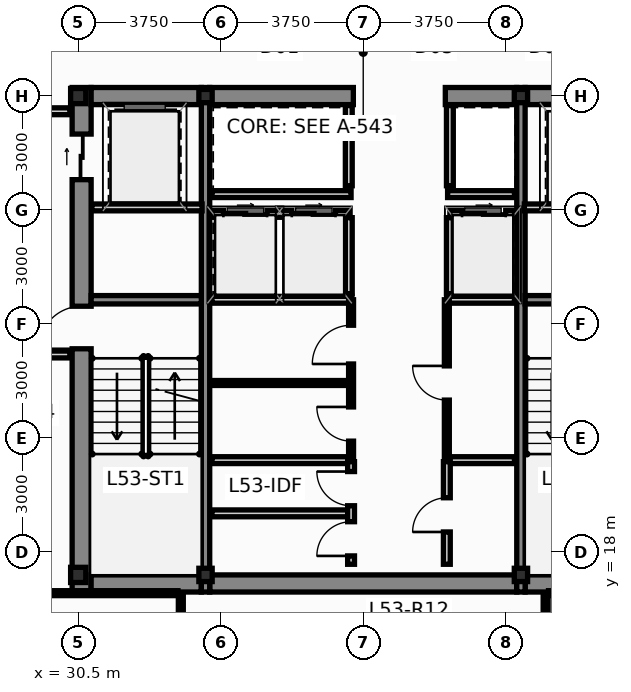
"""IFC4 building model, lengths in metres.
Left out: names, types, materials, properties, quantities, classifications, styles, units other than length and angle.
Written with IfcOpenShell. Run it as: python <this file> out.ifc"""

import sys

from ifc_helpers import new_model, si_unit, direction, frame, frame_2d, origin, origin_2d, place, context, subcontext, project, spatial, rectangle, hollow_rectangle, i_section, extrude, source, transform, mapped, element, fill, save


model = new_model("IFC4")
c1 = context("Model", 3, precision=1e-05, world=origin(), true_north=direction((0.0, 1.0)))
c2 = subcontext(c1, "Body", "Model", "MODEL_VIEW")
j1 = project(units=[si_unit("LENGTHUNIT", "METRE"), si_unit("PLANEANGLEUNIT", "RADIAN")], contexts=[c1])
p1 = place(None, origin())
s1 = spatial("IfcSite", under=j1, at=p1, CompositionType="ELEMENT")
p2 = place(p1, origin())
s2 = spatial("IfcBuilding", under=s1, at=p2, CompositionType="ELEMENT")
p3 = place(p2, frame((0.0, 0.0, 202.3)))
s3 = spatial("IfcBuildingStorey", under=s2, at=p3, CompositionType="ELEMENT", Elevation=202.3)
m1 = source(origin(), c2, "Body", "SweptSolid", [
    extrude(i_section(OverallWidth=0.4, OverallDepth=0.4, WebThickness=0.02, FlangeThickness=0.032, at=origin_2d()), origin(), (0.0, 0.0, 1.0), 3.65),
])
for number, where, z_axis, x_axis in (
    (1, (30.5, 17.4, 0.0), (0.0, 0.0, 1.0), (1.0, 0.0, 0.0)),
    (2, (30.5, 30.0, 0.0), (0.0, 0.0, 1.0), (1.0, 0.0, 0.0)),
):
    element("IfcColumn", number, at=place(p3, frame(where, z_axis=z_axis, x_axis=x_axis)), inside=s3, PredefinedType="COLUMN", context=c2, shape_type="MappedRepresentation", body=[
        mapped(m1, transform((0.0, 0.0, 0.0), scale=1.0)),
    ])
m2 = source(origin(), c2, "Body", "SweptSolid", [
    extrude(hollow_rectangle(XDim=0.35, YDim=0.35, WallThickness=0.016, at=origin_2d()), origin(), (0.0, 0.0, 1.0), 3.65),
])
for number, where, z_axis, x_axis in (
    (3, (33.85, 17.4, 0.0), (0.0, 0.0, 1.0), (1.0, 0.0, 0.0)),
    (4, (42.15, 17.4, 0.0), (0.0, 0.0, 1.0), (1.0, 0.0, 0.0)),
    (5, (33.85, 30.0, 0.0), (0.0, 0.0, 1.0), (1.0, 0.0, 0.0)),
    (6, (42.15, 30.0, 0.0), (0.0, 0.0, 1.0), (1.0, 0.0, 0.0)),
):
    element("IfcColumn", number, at=place(p3, frame(where, z_axis=z_axis, x_axis=x_axis)), inside=s3, PredefinedType="COLUMN", context=c2, shape_type="MappedRepresentation", body=[
        mapped(m2, transform((0.0, 0.0, 0.0), scale=1.0)),
    ])
p4 = place(p3, frame((30.59, 16.95, 0.0), z_axis=(0.0, 0.0, 1.0), x_axis=(0.0, 1.0, 0.0)))
e7 = element("IfcWall", 7, at=p4, inside=s3, PredefinedType="SHEAR", context=c2, shape_type="SweptSolid", body=[
    extrude(rectangle(XDim=13.275, YDim=0.5, at=frame_2d((6.638, 0.0))), origin(), (0.0, 0.0, 1.0), 3.65),
])
p5 = place(p4, frame((6.4, 0.0, 0.0)))
e8 = element("IfcOpeningElement", 8, at=p5, cuts=e7, PredefinedType="OPENING", context=c2, shape_type="SweptSolid", body=[
    extrude(rectangle(XDim=1.12, YDim=2.15, at=frame_2d((0.56, 1.075))), frame((0.0, 0.262, 0.0), z_axis=(0.0, -1.0, 0.0), x_axis=(1.0, 0.0, 0.0)), (0.0, 0.0, 1.0), 0.524),
])
p6 = place(p4, frame((10.85, 0.0, 0.0)))
e9 = element("IfcOpeningElement", 9, at=p6, cuts=e7, PredefinedType="OPENING", context=c2, shape_type="SweptSolid", body=[
    extrude(rectangle(XDim=1.2, YDim=2.2, at=frame_2d((0.6, 1.1))), frame((0.0, 0.262, 0.0), z_axis=(0.0, -1.0, 0.0), x_axis=(1.0, 0.0, 0.0)), (0.0, 0.0, 1.0), 0.524),
])
p7 = place(p3, frame((30.84, 17.175, 0.0), z_axis=(0.0, 0.0, 1.0), x_axis=(1.0, 0.0, 0.0)))
e10 = element("IfcWall", 10, at=p7, inside=s3, PredefinedType="SHEAR", context=c2, shape_type="SweptSolid", body=[
    extrude(rectangle(XDim=2.9, YDim=0.45, at=frame_2d((1.45, 0.0))), origin(), (0.0, 0.0, 1.0), 3.65),
])
p8 = place(p3, frame((33.96, 17.175, 0.0), z_axis=(0.0, 0.0, 1.0), x_axis=(1.0, 0.0, 0.0)))
e11 = element("IfcWall", 11, at=p8, inside=s3, PredefinedType="SHEAR", context=c2, shape_type="SweptSolid", body=[
    extrude(rectangle(XDim=8.08, YDim=0.45, at=frame_2d((4.04, 0.0))), origin(), (0.0, 0.0, 1.0), 3.65),
])
for number, where, z_axis, x_axis in (
    (12, (42.26, 17.175, 0.0), (0.0, 0.0, 1.0), (1.0, 0.0, 0.0)),
    (13, (30.84, 30.0, 0.0), (0.0, 0.0, 1.0), (1.0, 0.0, 0.0)),
):
    element("IfcWall", number, at=place(p3, frame(where, z_axis=z_axis, x_axis=x_axis)), inside=s3, PredefinedType="SHEAR", context=c2, shape_type="SweptSolid", body=[
        extrude(rectangle(XDim=2.9, YDim=0.45, at=frame_2d((1.45, 0.0))), origin(), (0.0, 0.0, 1.0), 3.65),
    ])
p9 = place(p3, frame((33.96, 30.0, 0.0), z_axis=(0.0, 0.0, 1.0), x_axis=(1.0, 0.0, 0.0)))
e14 = element("IfcWall", 14, at=p9, inside=s3, PredefinedType="SHEAR", context=c2, shape_type="SweptSolid", body=[
    extrude(rectangle(XDim=3.78, YDim=0.45, at=frame_2d((1.89, 0.0))), origin(), (0.0, 0.0, 1.0), 3.65),
])
p10 = place(p3, frame((40.16, 30.0, 0.0), z_axis=(0.0, 0.0, 1.0), x_axis=(1.0, 0.0, 0.0)))
e15 = element("IfcWall", 15, at=p10, inside=s3, PredefinedType="SHEAR", context=c2, shape_type="SweptSolid", body=[
    extrude(rectangle(XDim=1.88, YDim=0.45, at=frame_2d((0.94, 0.0))), origin(), (0.0, 0.0, 1.0), 3.65),
])
p11 = place(p3, frame((42.26, 30.0, 0.0), z_axis=(0.0, 0.0, 1.0), x_axis=(1.0, 0.0, 0.0)))
e16 = element("IfcWall", 16, at=p11, inside=s3, PredefinedType="SHEAR", context=c2, shape_type="SweptSolid", body=[
    extrude(rectangle(XDim=2.9, YDim=0.45, at=frame_2d((1.45, 0.0))), origin(), (0.0, 0.0, 1.0), 3.65),
])
for number, where, z_axis, x_axis in (
    (17, (33.85, 16.95, 0.0), (0.0, 0.0, 1.0), (0.0, 1.0, 0.0)),
    (18, (42.15, 16.95, 0.0), (0.0, 0.0, 1.0), (0.0, 1.0, 0.0)),
):
    element("IfcWall", number, at=place(p3, frame(where, z_axis=z_axis, x_axis=x_axis)), inside=s3, PredefinedType="SHEAR", context=c2, shape_type="SweptSolid", body=[
        extrude(rectangle(XDim=13.275, YDim=0.22, at=frame_2d((6.638, 0.0))), origin(), (0.0, 0.0, 1.0), 3.65),
    ])
for number, where, z_axis, x_axis in (
    (19, (30.84, 24.64, 0.0), (0.0, 0.0, 1.0), (1.0, 0.0, 0.0)),
    (20, (42.26, 24.64, 0.0), (0.0, 0.0, 1.0), (1.0, 0.0, 0.0)),
):
    element("IfcWall", number, at=place(p3, frame(where, z_axis=z_axis, x_axis=x_axis)), inside=s3, PredefinedType="SHEAR", context=c2, shape_type="SweptSolid", body=[
        extrude(rectangle(XDim=2.9, YDim=0.22, at=frame_2d((1.45, 0.0))), origin(), (0.0, 0.0, 1.0), 3.65),
    ])
p12 = place(p3, frame((34.02, 26.9, 0.0), z_axis=(0.0, 0.0, 1.0), x_axis=(1.0, 0.0, 0.0)))
e21 = element("IfcWall", 21, at=p12, inside=s3, PredefinedType="PARTITIONING", context=c2, shape_type="SweptSolid", body=[
    extrude(rectangle(XDim=3.6, YDim=0.18, at=frame_2d((1.8, 0.0))), origin(), (0.0, 0.0, 1.0), 3.4),
])
p13 = place(p12, frame((0.3, 0.0, 0.0)))
e22 = element("IfcOpeningElement", 22, at=p13, cuts=e21, PredefinedType="OPENING", context=c2, shape_type="SweptSolid", body=[
    extrude(rectangle(XDim=1.15, YDim=2.2, at=frame_2d((0.575, 1.1))), frame((0.0, 0.102, 0.0), z_axis=(0.0, -1.0, 0.0), x_axis=(1.0, 0.0, 0.0)), (0.0, 0.0, 1.0), 0.204),
])
p14 = place(p12, frame((2.1, 0.0, 0.0)))
e23 = element("IfcOpeningElement", 23, at=p14, cuts=e21, PredefinedType="OPENING", context=c2, shape_type="SweptSolid", body=[
    extrude(rectangle(XDim=1.15, YDim=2.2, at=frame_2d((0.575, 1.1))), frame((0.0, 0.102, 0.0), z_axis=(0.0, -1.0, 0.0), x_axis=(1.0, 0.0, 0.0)), (0.0, 0.0, 1.0), 0.204),
])
p15 = place(p3, frame((40.28, 26.9, 0.0), z_axis=(0.0, 0.0, 1.0), x_axis=(1.0, 0.0, 0.0)))
e24 = element("IfcWall", 24, at=p15, inside=s3, PredefinedType="PARTITIONING", context=c2, shape_type="SweptSolid", body=[
    extrude(rectangle(XDim=1.7, YDim=0.18, at=frame_2d((0.85, 0.0))), origin(), (0.0, 0.0, 1.0), 3.4),
])
p16 = place(p15, frame((0.32, 0.0, 0.0)))
e25 = element("IfcOpeningElement", 25, at=p16, cuts=e24, PredefinedType="OPENING", context=c2, shape_type="SweptSolid", body=[
    extrude(rectangle(XDim=1.15, YDim=2.2, at=frame_2d((0.575, 1.1))), frame((0.0, 0.102, 0.0), z_axis=(0.0, -1.0, 0.0), x_axis=(1.0, 0.0, 0.0)), (0.0, 0.0, 1.0), 0.204),
])
for number, where, z_axis, x_axis in (
    (26, (37.62, 24.8, 0.0), (0.0, 0.0, 1.0), (0.0, 1.0, 0.0)),
    (27, (40.28, 24.8, 0.0), (0.0, 0.0, 1.0), (0.0, 1.0, 0.0)),
):
    element("IfcWall", number, at=place(p3, frame(where, z_axis=z_axis, x_axis=x_axis)), inside=s3, PredefinedType="PARTITIONING", context=c2, shape_type="SweptSolid", body=[
        extrude(rectangle(XDim=2.0, YDim=0.18, at=frame_2d((1.0, 0.0))), origin(), (0.0, 0.0, 1.0), 3.4),
    ])
p17 = place(p3, frame((34.02, 24.64, 0.0), z_axis=(0.0, 0.0, 1.0), x_axis=(1.0, 0.0, 0.0)))
e28 = element("IfcWall", 28, at=p17, inside=s3, PredefinedType="PARTITIONING", context=c2, shape_type="SweptSolid", body=[
    extrude(rectangle(XDim=3.68, YDim=0.18, at=frame_2d((1.84, 0.0))), origin(), (0.0, 0.0, 1.0), 3.4),
])
p18 = place(p3, frame((40.2, 24.64, 0.0), z_axis=(0.0, 0.0, 1.0), x_axis=(1.0, 0.0, 0.0)))
e29 = element("IfcWall", 29, at=p18, inside=s3, PredefinedType="PARTITIONING", context=c2, shape_type="SweptSolid", body=[
    extrude(rectangle(XDim=1.78, YDim=0.18, at=frame_2d((0.89, 0.0))), origin(), (0.0, 0.0, 1.0), 3.4),
])
p19 = place(p3, frame((34.02, 27.42, 0.0), z_axis=(0.0, 0.0, 1.0), x_axis=(1.0, 0.0, 0.0)))
e30 = element("IfcWall", 30, at=p19, inside=s3, PredefinedType="PARTITIONING", context=c2, shape_type="SweptSolid", body=[
    extrude(rectangle(XDim=3.66, YDim=0.18, at=frame_2d((1.83, 0.0))), origin(), (0.0, 0.0, 1.0), 3.4),
])
p20 = place(p3, frame((40.22, 27.42, 0.0), z_axis=(0.0, 0.0, 1.0), x_axis=(1.0, 0.0, 0.0)))
e31 = element("IfcWall", 31, at=p20, inside=s3, PredefinedType="PARTITIONING", context=c2, shape_type="SweptSolid", body=[
    extrude(rectangle(XDim=1.76, YDim=0.18, at=frame_2d((0.88, 0.0))), origin(), (0.0, 0.0, 1.0), 3.4),
])
for number, where, z_axis, x_axis in (
    (32, (37.62, 27.64, 0.0), (0.0, 0.0, 1.0), (0.0, 1.0, 0.0)),
    (33, (40.28, 27.64, 0.0), (0.0, 0.0, 1.0), (0.0, 1.0, 0.0)),
):
    element("IfcWall", number, at=place(p3, frame(where, z_axis=z_axis, x_axis=x_axis)), inside=s3, PredefinedType="PARTITIONING", context=c2, shape_type="SweptSolid", body=[
        extrude(rectangle(XDim=2.11, YDim=0.18, at=frame_2d((1.055, 0.0))), origin(), (0.0, 0.0, 1.0), 3.4),
    ])
p21 = place(p3, frame((27.52, 23.2, 0.0), z_axis=(0.0, 0.0, 1.0), x_axis=(1.0, 0.0, 0.0)))
e34 = element("IfcWall", 34, at=p21, inside=s3, PredefinedType="PARTITIONING", context=c2, shape_type="SweptSolid", body=[
    extrude(rectangle(XDim=2.76, YDim=0.18, at=frame_2d((1.38, 0.0))), origin(), (0.0, 0.0, 1.0), 3.4),
])
p22 = place(p3, frame((27.52, 29.6, 0.0), z_axis=(0.0, 0.0, 1.0), x_axis=(1.0, 0.0, 0.0)))
e35 = element("IfcWall", 35, at=p22, inside=s3, PredefinedType="PARTITIONING", context=c2, shape_type="SweptSolid", body=[
    extrude(rectangle(XDim=2.76, YDim=0.18, at=frame_2d((1.38, 0.0))), origin(), (0.0, 0.0, 1.0), 2.925),
])
for number, where, z_axis, x_axis in (
    (36, (30.86, 27.07, 0.0), (0.0, 0.0, 1.0), (1.0, 0.0, 0.0)),
    (37, (42.24, 27.07, 0.0), (0.0, 0.0, 1.0), (1.0, 0.0, 0.0)),
):
    element("IfcWall", number, at=place(p3, frame(where, z_axis=z_axis, x_axis=x_axis)), inside=s3, PredefinedType="PARTITIONING", context=c2, shape_type="SweptSolid", body=[
        extrude(rectangle(XDim=2.9, YDim=0.18, at=frame_2d((1.45, 0.0))), origin(), (0.0, 0.0, 1.0), 3.4),
    ])
p23 = place(p3, frame((34.02, 20.42, 0.0), z_axis=(0.0, 0.0, 1.0), x_axis=(1.0, 0.0, 0.0)))
e38 = element("IfcWall", 38, at=p23, inside=s3, PredefinedType="PARTITIONING", context=c2, shape_type="SweptSolid", body=[
    extrude(rectangle(XDim=3.64, YDim=0.18, at=frame_2d((1.82, 0.0))), origin(), (0.0, 0.0, 1.0), 3.4),
])
p24 = place(p3, frame((40.22, 20.42, 0.0), z_axis=(0.0, 0.0, 1.0), x_axis=(1.0, 0.0, 0.0)))
e39 = element("IfcWall", 39, at=p24, inside=s3, PredefinedType="PARTITIONING", context=c2, shape_type="SweptSolid", body=[
    extrude(rectangle(XDim=1.76, YDim=0.18, at=frame_2d((0.88, 0.0))), origin(), (0.0, 0.0, 1.0), 3.4),
])
p25 = place(p3, frame((34.02, 22.45, 0.0), z_axis=(0.0, 0.0, 1.0), x_axis=(1.0, 0.0, 0.0)))
e40 = element("IfcWall", 40, at=p25, inside=s3, PredefinedType="PARTITIONING", context=c2, shape_type="SweptSolid", body=[
    extrude(rectangle(XDim=3.58, YDim=0.13, at=frame_2d((1.79, 0.0))), origin(), (0.0, 0.0, 1.0), 3.4),
])
p26 = place(p3, frame((37.68, 20.5, 0.0), z_axis=(0.0, 0.0, 1.0), x_axis=(0.0, 1.0, 0.0)))
e41 = element("IfcWall", 41, at=p26, inside=s3, PredefinedType="PARTITIONING", context=c2, shape_type="SweptSolid", body=[
    extrude(rectangle(XDim=4.14, YDim=0.13, at=frame_2d((2.07, 0.0))), origin(), (0.0, 0.0, 1.0), 3.4),
])
p27 = place(p26, frame((0.42, 0.0, 0.0)))
e42 = element("IfcOpeningElement", 42, at=p27, cuts=e41, PredefinedType="OPENING", context=c2, shape_type="SweptSolid", body=[
    extrude(rectangle(XDim=0.9, YDim=2.1, at=frame_2d((0.45, 1.05))), frame((0.0, 0.077, 0.0), z_axis=(0.0, -1.0, 0.0), x_axis=(1.0, 0.0, 0.0)), (0.0, 0.0, 1.0), 0.154),
])
p28 = place(p26, frame((2.45, 0.0, 0.0)))
e43 = element("IfcOpeningElement", 43, at=p28, cuts=e41, PredefinedType="OPENING", context=c2, shape_type="SweptSolid", body=[
    extrude(rectangle(XDim=1.02, YDim=2.15, at=frame_2d((0.51, 1.075))), frame((0.0, 0.077, 0.0), z_axis=(0.0, -1.0, 0.0), x_axis=(1.0, 0.0, 0.0)), (0.0, 0.0, 1.0), 0.154),
])
p29 = place(p3, frame((40.2, 20.5, 0.0), z_axis=(0.0, 0.0, 1.0), x_axis=(0.0, 1.0, 0.0)))
e44 = element("IfcWall", 44, at=p29, inside=s3, PredefinedType="PARTITIONING", context=c2, shape_type="SweptSolid", body=[
    extrude(rectangle(XDim=4.14, YDim=0.13, at=frame_2d((2.07, 0.0))), origin(), (0.0, 0.0, 1.0), 3.4),
])
p30 = place(p29, frame((1.5, 0.0, 0.0)))
e45 = element("IfcOpeningElement", 45, at=p30, cuts=e44, PredefinedType="OPENING", context=c2, shape_type="SweptSolid", body=[
    extrude(rectangle(XDim=0.9, YDim=2.1, at=frame_2d((0.45, 1.05))), frame((0.0, 0.077, 0.0), z_axis=(0.0, -1.0, 0.0), x_axis=(1.0, 0.0, 0.0)), (0.0, 0.0, 1.0), 0.154),
])
p31 = place(p3, frame((34.02, 19.02, 0.0), z_axis=(0.0, 0.0, 1.0), x_axis=(1.0, 0.0, 0.0)))
e46 = element("IfcWall", 46, at=p31, inside=s3, PredefinedType="PARTITIONING", context=c2, shape_type="SweptSolid", body=[
    extrude(rectangle(XDim=3.58, YDim=0.18, at=frame_2d((1.79, 0.0))), origin(), (0.0, 0.0, 1.0), 3.4),
])
p32 = place(p3, frame((37.68, 17.68, 0.0), z_axis=(0.0, 0.0, 1.0), x_axis=(0.0, 1.0, 0.0)))
e47 = element("IfcWall", 47, at=p32, inside=s3, PredefinedType="PARTITIONING", context=c2, shape_type="SweptSolid", body=[
    extrude(rectangle(XDim=2.7, YDim=0.18, at=frame_2d((1.35, 0.0))), origin(), (0.0, 0.0, 1.0), 3.4),
])
p33 = place(p32, frame((0.22, 0.0, 0.0)))
e48 = element("IfcOpeningElement", 48, at=p33, cuts=e47, PredefinedType="OPENING", context=c2, shape_type="SweptSolid", body=[
    extrude(rectangle(XDim=0.9, YDim=2.1, at=frame_2d((0.45, 1.05))), frame((0.0, 0.102, 0.0), z_axis=(0.0, -1.0, 0.0), x_axis=(1.0, 0.0, 0.0)), (0.0, 0.0, 1.0), 0.204),
])
p34 = place(p32, frame((1.54, 0.0, 0.0)))
e49 = element("IfcOpeningElement", 49, at=p34, cuts=e47, PredefinedType="OPENING", context=c2, shape_type="SweptSolid", body=[
    extrude(rectangle(XDim=0.9, YDim=2.1, at=frame_2d((0.45, 1.05))), frame((0.0, 0.102, 0.0), z_axis=(0.0, -1.0, 0.0), x_axis=(1.0, 0.0, 0.0)), (0.0, 0.0, 1.0), 0.204),
])
p35 = place(p3, frame((40.2, 17.68, 0.0), z_axis=(0.0, 0.0, 1.0), x_axis=(0.0, 1.0, 0.0)))
e50 = element("IfcWall", 50, at=p35, inside=s3, PredefinedType="PARTITIONING", context=c2, shape_type="SweptSolid", body=[
    extrude(rectangle(XDim=2.7, YDim=0.18, at=frame_2d((1.35, 0.0))), origin(), (0.0, 0.0, 1.0), 3.4),
])
p36 = place(p35, frame((0.85, 0.0, 0.0)))
e51 = element("IfcOpeningElement", 51, at=p36, cuts=e50, PredefinedType="OPENING", context=c2, shape_type="SweptSolid", body=[
    extrude(rectangle(XDim=0.9, YDim=2.1, at=frame_2d((0.45, 1.05))), frame((0.0, 0.102, 0.0), z_axis=(0.0, -1.0, 0.0), x_axis=(1.0, 0.0, 0.0)), (0.0, 0.0, 1.0), 0.204),
])
p37 = place(p3, frame((42.875, 16.92, 0.0), z_axis=(0.0, 0.0, 1.0), x_axis=(1.0, 0.0, 0.0)))
e52 = element("IfcWall", 52, at=p37, inside=s3, PredefinedType="PARTITIONING", context=c2, shape_type="SweptSolid", body=[
    extrude(rectangle(XDim=9.62, YDim=0.13, at=frame_2d((4.81, 0.0))), origin(), (0.0, 0.0, 1.0), 2.925),
])
p38 = place(p37, frame((4.33, 0.0, 0.0)))
e53 = element("IfcOpeningElement", 53, at=p38, cuts=e52, PredefinedType="OPENING", context=c2, shape_type="SweptSolid", body=[
    extrude(rectangle(XDim=0.96, YDim=2.15, at=frame_2d((0.48, 1.075))), frame((0.0, 0.077, 0.0), z_axis=(0.0, -1.0, 0.0), x_axis=(1.0, 0.0, 0.0)), (0.0, 0.0, 1.0), 0.154),
])
p39 = place(p3, frame((27.405, 16.92, 0.0), z_axis=(0.0, 0.0, 1.0), x_axis=(1.0, 0.0, 0.0)))
e54 = element("IfcWall", 54, at=p39, inside=s3, PredefinedType="PARTITIONING", context=c2, shape_type="SweptSolid", body=[
    extrude(rectangle(XDim=5.72, YDim=0.13, at=frame_2d((2.86, 0.0))), origin(), (0.0, 0.0, 1.0), 2.925),
])
for number, where, z_axis, x_axis in (
    (55, (33.2, 13.535, 0.0), (0.0, 0.0, 1.0), (0.0, 1.0, 0.0)),
    (56, (42.8, 13.535, 0.0), (0.0, 0.0, 1.0), (0.0, 1.0, 0.0)),
):
    element("IfcWall", number, at=place(p3, frame(where, z_axis=z_axis, x_axis=x_axis)), inside=s3, PredefinedType="PARTITIONING", context=c2, shape_type="SweptSolid", body=[
        extrude(rectangle(XDim=3.31, YDim=0.13, at=frame_2d((1.655, 0.0))), origin(), (0.0, 0.0, 1.0), 3.4),
    ])
p40 = place(p5, origin())
e57 = element("IfcDoor", 57, at=p40, inside=s3, OperationType="SINGLE_SWING_LEFT", PredefinedType="DOOR", context=c2, shape_type="SweptSolid", body=[
    extrude(rectangle(XDim=1.12, YDim=2.15, at=frame_2d((0.56, 1.075))), frame((0.0, 0.025, 0.0), z_axis=(0.0, -1.0, 0.0), x_axis=(1.0, 0.0, 0.0)), (0.0, 0.0, 1.0), 0.05),
])
fill(e8, e57)
p41 = place(p6, origin())
e58 = element("IfcDoor", 58, at=p41, inside=s3, OperationType="SLIDING_TO_LEFT", PredefinedType="DOOR", context=c2, shape_type="SweptSolid", body=[
    extrude(rectangle(XDim=1.2, YDim=2.2, at=frame_2d((0.6, 1.1))), frame((0.0, 0.025, 0.0), z_axis=(0.0, -1.0, 0.0), x_axis=(1.0, 0.0, 0.0)), (0.0, 0.0, 1.0), 0.05),
])
fill(e9, e58)
p42 = place(p13, origin())
e59 = element("IfcDoor", 59, at=p42, inside=s3, OperationType="SLIDING_TO_LEFT", PredefinedType="DOOR", context=c2, shape_type="SweptSolid", body=[
    extrude(rectangle(XDim=1.15, YDim=2.2, at=frame_2d((0.575, 1.1))), frame((0.0, 0.025, 0.0), z_axis=(0.0, -1.0, 0.0), x_axis=(1.0, 0.0, 0.0)), (0.0, 0.0, 1.0), 0.05),
])
fill(e22, e59)
p43 = place(p14, origin())
e60 = element("IfcDoor", 60, at=p43, inside=s3, OperationType="SLIDING_TO_RIGHT", PredefinedType="DOOR", context=c2, shape_type="SweptSolid", body=[
    extrude(rectangle(XDim=1.15, YDim=2.2, at=frame_2d((0.575, 1.1))), frame((0.0, 0.025, 0.0), z_axis=(0.0, -1.0, 0.0), x_axis=(1.0, 0.0, 0.0)), (0.0, 0.0, 1.0), 0.05),
])
fill(e23, e60)
p44 = place(p16, origin())
e61 = element("IfcDoor", 61, at=p44, inside=s3, OperationType="SLIDING_TO_LEFT", PredefinedType="DOOR", context=c2, shape_type="SweptSolid", body=[
    extrude(rectangle(XDim=1.15, YDim=2.2, at=frame_2d((0.575, 1.1))), frame((0.0, 0.025, 0.0), z_axis=(0.0, -1.0, 0.0), x_axis=(1.0, 0.0, 0.0)), (0.0, 0.0, 1.0), 0.05),
])
fill(e25, e61)
p45 = place(p27, origin())
e62 = element("IfcDoor", 62, at=p45, inside=s3, OperationType="SINGLE_SWING_RIGHT", PredefinedType="DOOR", context=c2, shape_type="SweptSolid", body=[
    extrude(rectangle(XDim=0.9, YDim=2.1, at=frame_2d((0.45, 1.05))), frame((0.0, 0.025, 0.0), z_axis=(0.0, -1.0, 0.0), x_axis=(1.0, 0.0, 0.0)), (0.0, 0.0, 1.0), 0.05),
])
fill(e42, e62)
p46 = place(p28, origin())
e63 = element("IfcDoor", 63, at=p46, inside=s3, OperationType="SINGLE_SWING_LEFT", PredefinedType="DOOR", context=c2, shape_type="SweptSolid", body=[
    extrude(rectangle(XDim=1.02, YDim=2.15, at=frame_2d((0.51, 1.075))), frame((0.0, 0.025, 0.0), z_axis=(0.0, -1.0, 0.0), x_axis=(1.0, 0.0, 0.0)), (0.0, 0.0, 1.0), 0.05),
])
fill(e43, e63)
p47 = place(p30, origin())
e64 = element("IfcDoor", 64, at=p47, inside=s3, OperationType="SINGLE_SWING_RIGHT", PredefinedType="DOOR", context=c2, shape_type="SweptSolid", body=[
    extrude(rectangle(XDim=0.9, YDim=2.1, at=frame_2d((0.45, 1.05))), frame((0.0, 0.025, 0.0), z_axis=(0.0, -1.0, 0.0), x_axis=(1.0, 0.0, 0.0)), (0.0, 0.0, 1.0), 0.05),
])
fill(e45, e64)
p48 = place(p33, origin())
e65 = element("IfcDoor", 65, at=p48, inside=s3, OperationType="SINGLE_SWING_LEFT", PredefinedType="DOOR", context=c2, shape_type="SweptSolid", body=[
    extrude(rectangle(XDim=0.9, YDim=2.1, at=frame_2d((0.45, 1.05))), frame((0.0, 0.025, 0.0), z_axis=(0.0, -1.0, 0.0), x_axis=(1.0, 0.0, 0.0)), (0.0, 0.0, 1.0), 0.05),
])
fill(e48, e65)
p49 = place(p34, origin())
e66 = element("IfcDoor", 66, at=p49, inside=s3, OperationType="SINGLE_SWING_RIGHT", PredefinedType="DOOR", context=c2, shape_type="SweptSolid", body=[
    extrude(rectangle(XDim=0.9, YDim=2.1, at=frame_2d((0.45, 1.05))), frame((0.0, 0.025, 0.0), z_axis=(0.0, -1.0, 0.0), x_axis=(1.0, 0.0, 0.0)), (0.0, 0.0, 1.0), 0.05),
])
fill(e49, e66)
p50 = place(p36, origin())
e67 = element("IfcDoor", 67, at=p50, inside=s3, OperationType="SINGLE_SWING_LEFT", PredefinedType="DOOR", context=c2, shape_type="SweptSolid", body=[
    extrude(rectangle(XDim=0.9, YDim=2.1, at=frame_2d((0.45, 1.05))), frame((0.0, 0.025, 0.0), z_axis=(0.0, -1.0, 0.0), x_axis=(1.0, 0.0, 0.0)), (0.0, 0.0, 1.0), 0.05),
])
fill(e51, e67)
save(model, sys.argv[1])
